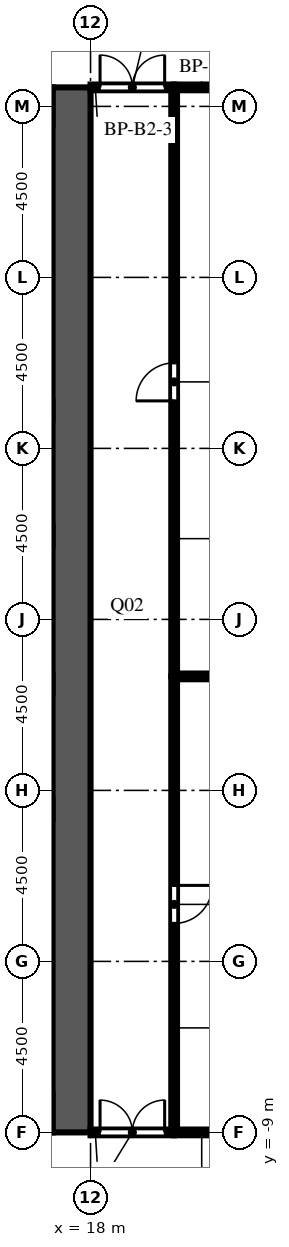
"""IFC4 building model, lengths in metres.
Left out: names, types, materials, properties, quantities, classifications, styles, units other than length and angle.
Written with IfcOpenShell. Run it as: python <this file> out.ifc"""

import sys

from ifc_helpers import new_model, si_unit, direction, frame, frame_2d, origin, place, context, subcontext, project, spatial, rectangle, extrude, element, fill, save


model = new_model("IFC4")
c1 = context("Model", 3, precision=1e-05, world=origin(), true_north=direction((0.0, 1.0)))
c2 = subcontext(c1, "Body", "Model", "MODEL_VIEW")
j1 = project(units=[si_unit("LENGTHUNIT", "METRE"), si_unit("PLANEANGLEUNIT", "RADIAN")], contexts=[c1])
p1 = place(None, origin())
s1 = spatial("IfcSite", under=j1, at=p1, CompositionType="ELEMENT")
p2 = place(p1, origin())
s2 = spatial("IfcBuilding", under=s1, at=p2, CompositionType="ELEMENT")
p3 = place(p2, frame((0.0, 0.0, -10.0)))
s3 = spatial("IfcBuildingStorey", under=s2, at=p3, CompositionType="ELEMENT", Elevation=-10.0)
p4 = place(p3, frame((17.5, -9.0, 0.0), z_axis=(0.0, 0.0, 1.0), x_axis=(0.0, 1.0, 0.0)))
e1 = element("IfcWall", 1, at=p4, inside=s3, PredefinedType="SHEAR", context=c2, shape_type="SweptSolid", body=[
    extrude(rectangle(XDim=27.5, YDim=1.0, at=frame_2d((13.75, 0.0))), origin(), (0.0, 0.0, 1.0), 5.0),
])
p5 = place(p4, frame((12.55, 0.0, 0.0)))
e2 = element("IfcOpeningElement", 2, at=p5, cuts=e1, PredefinedType="OPENING", context=c2, shape_type="SweptSolid", body=[
    extrude(rectangle(XDim=2.4, YDim=2.4, at=frame_2d((1.2, 1.2))), frame((0.0, 0.51, 0.0), z_axis=(0.0, -1.0, 0.0), x_axis=(1.0, 0.0, 0.0)), (0.0, 0.0, 1.0), 1.02),
])
p6 = place(p4, frame((6.825, 0.0, 0.0)))
e3 = element("IfcOpeningElement", 3, at=p6, cuts=e1, PredefinedType="OPENING", context=c2, shape_type="SweptSolid", body=[
    extrude(rectangle(XDim=1.2, YDim=2.1, at=frame_2d((0.6, 1.05))), frame((0.0, 0.51, 0.0), z_axis=(0.0, -1.0, 0.0), x_axis=(1.0, 0.0, 0.0)), (0.0, 0.0, 1.0), 1.02),
])
p7 = place(p4, frame((19.475, 0.0, 0.0)))
e4 = element("IfcOpeningElement", 4, at=p7, cuts=e1, PredefinedType="OPENING", context=c2, shape_type="SweptSolid", body=[
    extrude(rectangle(XDim=1.2, YDim=2.1, at=frame_2d((0.6, 1.05))), frame((0.0, 0.51, 0.0), z_axis=(0.0, -1.0, 0.0), x_axis=(1.0, 0.0, 0.0)), (0.0, 0.0, 1.0), 1.02),
])
p8 = place(p3, frame((18.0, -9.0, 0.0), z_axis=(0.0, 0.0, 1.0), x_axis=(1.0, 0.0, 0.0)))
e5 = element("IfcWall", 5, at=p8, inside=s3, PredefinedType="PARTITIONING", context=c2, shape_type="SweptSolid", body=[
    extrude(rectangle(XDim=2.2, YDim=0.15, at=frame_2d((1.1, 0.0))), origin(), (0.0, 0.0, 1.0), 4.6),
])
p9 = place(p8, frame((0.25, 0.0, 0.0)))
e6 = element("IfcOpeningElement", 6, at=p9, cuts=e5, PredefinedType="OPENING", context=c2, shape_type="SweptSolid", body=[
    extrude(rectangle(XDim=1.7, YDim=2.1, at=frame_2d((0.85, 1.05))), frame((0.0, 0.085, 0.0), z_axis=(0.0, -1.0, 0.0), x_axis=(1.0, 0.0, 0.0)), (0.0, 0.0, 1.0), 0.17),
])
p10 = place(p3, frame((18.0, 18.5, 0.0), z_axis=(0.0, 0.0, 1.0), x_axis=(1.0, 0.0, 0.0)))
e7 = element("IfcWall", 7, at=p10, inside=s3, PredefinedType="PARTITIONING", context=c2, shape_type="SweptSolid", body=[
    extrude(rectangle(XDim=2.2, YDim=0.15, at=frame_2d((1.1, 0.0))), origin(), (0.0, 0.0, 1.0), 4.6),
])
p11 = place(p10, frame((0.25, 0.0, 0.0)))
e8 = element("IfcOpeningElement", 8, at=p11, cuts=e7, PredefinedType="OPENING", context=c2, shape_type="SweptSolid", body=[
    extrude(rectangle(XDim=1.7, YDim=2.1, at=frame_2d((0.85, 1.05))), frame((0.0, 0.085, 0.0), z_axis=(0.0, -1.0, 0.0), x_axis=(1.0, 0.0, 0.0)), (0.0, 0.0, 1.0), 0.17),
])
p12 = place(p3, frame((20.2, -9.0, 0.0), z_axis=(0.0, 0.0, 1.0), x_axis=(0.0, 1.0, 0.0)))
e9 = element("IfcWall", 9, at=p12, inside=s3, PredefinedType="PARTITIONING", context=c2, shape_type="SweptSolid", body=[
    extrude(rectangle(XDim=12.0, YDim=0.15, at=frame_2d((6.0, 0.0))), origin(), (0.0, 0.0, 1.0), 4.6),
])
p13 = place(p12, frame((5.5, 0.0, 0.0)))
e10 = element("IfcOpeningElement", 10, at=p13, cuts=e9, PredefinedType="OPENING", context=c2, shape_type="SweptSolid", body=[
    extrude(rectangle(XDim=1.0, YDim=2.1, at=frame_2d((0.5, 1.05))), frame((0.0, 0.085, 0.0), z_axis=(0.0, -1.0, 0.0), x_axis=(1.0, 0.0, 0.0)), (0.0, 0.0, 1.0), 0.17),
])
p14 = place(p3, frame((20.2, 3.0, 0.0), z_axis=(0.0, 0.0, 1.0), x_axis=(0.0, 1.0, 0.0)))
e11 = element("IfcWall", 11, at=p14, inside=s3, PredefinedType="PARTITIONING", context=c2, shape_type="SweptSolid", body=[
    extrude(rectangle(XDim=15.5, YDim=0.15, at=frame_2d((7.75, 0.0))), origin(), (0.0, 0.0, 1.0), 4.6),
])
p15 = place(p14, frame((7.25, 0.0, 0.0)))
e12 = element("IfcOpeningElement", 12, at=p15, cuts=e11, PredefinedType="OPENING", context=c2, shape_type="SweptSolid", body=[
    extrude(rectangle(XDim=1.0, YDim=2.1, at=frame_2d((0.5, 1.05))), frame((0.0, 0.085, 0.0), z_axis=(0.0, -1.0, 0.0), x_axis=(1.0, 0.0, 0.0)), (0.0, 0.0, 1.0), 0.17),
])
for number, where, z_axis, x_axis in (
    (13, (20.2, -9.0, 0.0), (0.0, 0.0, 1.0), (1.0, 0.0, 0.0)),
    (14, (20.2, 18.5, 0.0), (0.0, 0.0, 1.0), (1.0, 0.0, 0.0)),
):
    element("IfcWall", number, at=place(p3, frame(where, z_axis=z_axis, x_axis=x_axis)), inside=s3, PredefinedType="PARTITIONING", context=c2, shape_type="SweptSolid", body=[
        extrude(rectangle(XDim=1.45, YDim=0.15, at=frame_2d((0.725, 0.0))), origin(), (0.0, 0.0, 1.0), 4.6),
    ])
p16 = place(p3, frame((20.2, 3.0, 0.0), z_axis=(0.0, 0.0, 1.0), x_axis=(1.0, 0.0, 0.0)))
e15 = element("IfcWall", 15, at=p16, inside=s3, PredefinedType="PARTITIONING", context=c2, shape_type="SweptSolid", body=[
    extrude(rectangle(XDim=15.5, YDim=0.15, at=frame_2d((7.75, 0.0))), origin(), (0.0, 0.0, 1.0), 4.6),
])
p17 = place(p5, origin())
e16 = element("IfcDoor", 16, at=p17, inside=s3, OperationType="DOUBLE_DOOR_DOUBLE_SWING", PredefinedType="DOOR", context=c2, shape_type="SweptSolid", body=[
    extrude(rectangle(XDim=2.4, YDim=2.4, at=frame_2d((1.2, 1.2))), frame((0.0, 0.025, 0.0), z_axis=(0.0, -1.0, 0.0), x_axis=(1.0, 0.0, 0.0)), (0.0, 0.0, 1.0), 0.05),
])
fill(e2, e16)
p18 = place(p6, frame((1.2, 0.0, 0.0), z_axis=(0.0, 0.0, 1.0), x_axis=(-1.0, 0.0, 0.0)))
e17 = element("IfcDoor", 17, at=p18, inside=s3, OperationType="SINGLE_SWING_LEFT", PredefinedType="DOOR", context=c2, shape_type="SweptSolid", body=[
    extrude(rectangle(XDim=1.2, YDim=2.1, at=frame_2d((0.6, 1.05))), frame((0.0, 0.025, 0.0), z_axis=(0.0, -1.0, 0.0), x_axis=(1.0, 0.0, 0.0)), (0.0, 0.0, 1.0), 0.05),
])
fill(e3, e17)
p19 = place(p7, frame((1.2, 0.0, 0.0), z_axis=(0.0, 0.0, 1.0), x_axis=(-1.0, 0.0, 0.0)))
e18 = element("IfcDoor", 18, at=p19, inside=s3, OperationType="SINGLE_SWING_LEFT", PredefinedType="DOOR", context=c2, shape_type="SweptSolid", body=[
    extrude(rectangle(XDim=1.2, YDim=2.1, at=frame_2d((0.6, 1.05))), frame((0.0, 0.025, 0.0), z_axis=(0.0, -1.0, 0.0), x_axis=(1.0, 0.0, 0.0)), (0.0, 0.0, 1.0), 0.05),
])
fill(e4, e18)
p20 = place(p13, origin())
e19 = element("IfcDoor", 19, at=p20, inside=s3, OperationType="SINGLE_SWING_RIGHT", PredefinedType="DOOR", context=c2, shape_type="SweptSolid", body=[
    extrude(rectangle(XDim=1.0, YDim=2.1, at=frame_2d((0.5, 1.05))), frame((0.0, 0.025, 0.0), z_axis=(0.0, -1.0, 0.0), x_axis=(1.0, 0.0, 0.0)), (0.0, 0.0, 1.0), 0.05),
])
fill(e10, e19)
p21 = place(p15, origin())
e20 = element("IfcDoor", 20, at=p21, inside=s3, OperationType="SINGLE_SWING_LEFT", PredefinedType="DOOR", context=c2, shape_type="SweptSolid", body=[
    extrude(rectangle(XDim=1.0, YDim=2.1, at=frame_2d((0.5, 1.05))), frame((0.0, 0.025, 0.0), z_axis=(0.0, -1.0, 0.0), x_axis=(1.0, 0.0, 0.0)), (0.0, 0.0, 1.0), 0.05),
])
fill(e12, e20)
p22 = place(p9, origin())
e21 = element("IfcDoor", 21, at=p22, inside=s3, OperationType="DOUBLE_DOOR_DOUBLE_SWING", PredefinedType="DOOR", context=c2, shape_type="SweptSolid", body=[
    extrude(rectangle(XDim=1.7, YDim=2.1, at=frame_2d((0.85, 1.05))), frame((0.0, 0.025, 0.0), z_axis=(0.0, -1.0, 0.0), x_axis=(1.0, 0.0, 0.0)), (0.0, 0.0, 1.0), 0.05),
])
fill(e6, e21)
p23 = place(p11, origin())
e22 = element("IfcDoor", 22, at=p23, inside=s3, OperationType="DOUBLE_DOOR_DOUBLE_SWING", PredefinedType="DOOR", context=c2, shape_type="SweptSolid", body=[
    extrude(rectangle(XDim=1.7, YDim=2.1, at=frame_2d((0.85, 1.05))), frame((0.0, 0.025, 0.0), z_axis=(0.0, -1.0, 0.0), x_axis=(1.0, 0.0, 0.0)), (0.0, 0.0, 1.0), 0.05),
])
fill(e8, e22)
save(model, sys.argv[1])
